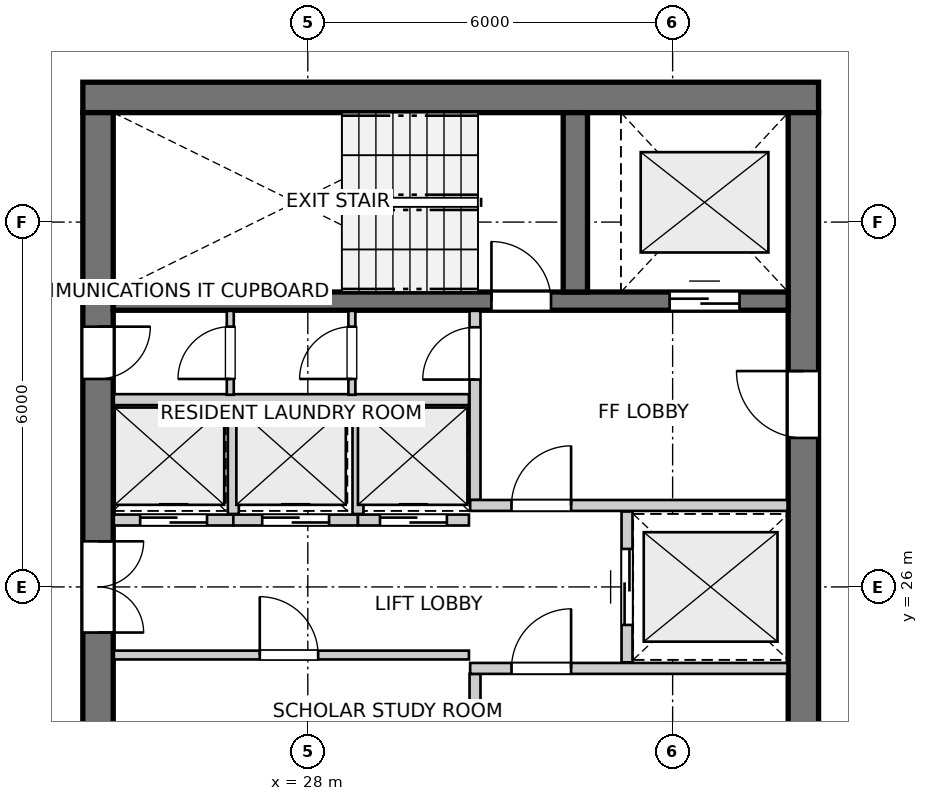
"""IFC4 building model, lengths in metres.
Left out: names, types, materials, properties, quantities, classifications, styles, units other than length and angle.
Written with IfcOpenShell. Run it as: python <this file> out.ifc"""

import sys

from ifc_helpers import new_model, si_unit, direction, frame, frame_2d, origin, place, context, subcontext, project, spatial, rectangle, extrude, source, transform, mapped, element, fill, save


model = new_model("IFC4")
c1 = context("Model", 3, precision=1e-05, world=origin(), true_north=direction((0.0, 1.0)))
c2 = subcontext(c1, "Body", "Model", "MODEL_VIEW")
j1 = project(units=[si_unit("LENGTHUNIT", "METRE"), si_unit("PLANEANGLEUNIT", "RADIAN")], contexts=[c1])
p1 = place(None, origin())
s1 = spatial("IfcSite", under=j1, at=p1, CompositionType="ELEMENT")
p2 = place(p1, origin())
s2 = spatial("IfcBuilding", under=s1, at=p2, CompositionType="ELEMENT")
p3 = place(p2, frame((0.0, 0.0, 214.8)))
s3 = spatial("IfcBuildingStorey", under=s2, at=p3, CompositionType="ELEMENT", Elevation=214.8)
p4 = place(p3, frame((36.4, 34.05, 0.0), z_axis=(0.0, 0.0, 1.0), x_axis=(-1.0, 0.0, 0.0)))
e1 = element("IfcWall", 1, at=p4, inside=s3, PredefinedType="SHEAR", context=c2, shape_type="SweptSolid", body=[
    extrude(rectangle(XDim=12.1, YDim=0.5, at=frame_2d((6.05, 0.0))), origin(), (0.0, 0.0, 1.0), 2.96),
])
p5 = place(p3, frame((24.55, 33.8, 0.0), z_axis=(0.0, 0.0, 1.0), x_axis=(0.0, -1.0, 0.0)))
e2 = element("IfcWall", 2, at=p5, inside=s3, PredefinedType="SHEAR", context=c2, shape_type="SweptSolid", body=[
    extrude(rectangle(XDim=15.6, YDim=0.5, at=frame_2d((7.8, 0.0))), origin(), (0.0, 0.0, 1.0), 2.96),
])
p6 = place(p5, frame((7.05, 0.0, 0.0)))
e3 = element("IfcOpeningElement", 3, at=p6, cuts=e2, PredefinedType="OPENING", context=c2, shape_type="SweptSolid", body=[
    extrude(rectangle(XDim=1.5, YDim=2.15, at=frame_2d((0.75, 1.075))), frame((0.0, 0.26, 0.0), z_axis=(0.0, -1.0, 0.0), x_axis=(1.0, 0.0, 0.0)), (0.0, 0.0, 1.0), 0.52),
])
p7 = place(p5, frame((3.52, 0.0, 0.0)))
e4 = element("IfcOpeningElement", 4, at=p7, cuts=e2, PredefinedType="OPENING", context=c2, shape_type="SweptSolid", body=[
    extrude(rectangle(XDim=0.86, YDim=2.05, at=frame_2d((0.43, 1.025))), frame((0.0, 0.26, 0.0), z_axis=(0.0, -1.0, 0.0), x_axis=(1.0, 0.0, 0.0)), (0.0, 0.0, 1.0), 0.52),
])
p8 = place(p5, frame((11.22, 0.0, 0.0)))
e5 = element("IfcOpeningElement", 5, at=p8, cuts=e2, PredefinedType="OPENING", context=c2, shape_type="SweptSolid", body=[
    extrude(rectangle(XDim=0.86, YDim=2.05, at=frame_2d((0.43, 1.025))), frame((0.0, 0.26, 0.0), z_axis=(0.0, -1.0, 0.0), x_axis=(1.0, 0.0, 0.0)), (0.0, 0.0, 1.0), 0.52),
])
p9 = place(p3, frame((36.15, 18.2, 0.0), z_axis=(0.0, 0.0, 1.0), x_axis=(0.0, 1.0, 0.0)))
e6 = element("IfcWall", 6, at=p9, inside=s3, PredefinedType="SHEAR", context=c2, shape_type="SweptSolid", body=[
    extrude(rectangle(XDim=15.6, YDim=0.5, at=frame_2d((7.8, 0.0))), origin(), (0.0, 0.0, 1.0), 2.96),
])
p10 = place(p9, frame((4.25, 0.0, 0.0)))
e7 = element("IfcOpeningElement", 7, at=p10, cuts=e6, PredefinedType="OPENING", context=c2, shape_type="SweptSolid", body=[
    extrude(rectangle(XDim=1.1, YDim=2.15, at=frame_2d((0.55, 1.075))), frame((0.0, 0.26, 0.0), z_axis=(0.0, -1.0, 0.0), x_axis=(1.0, 0.0, 0.0)), (0.0, 0.0, 1.0), 0.52),
])
p11 = place(p9, frame((10.25, 0.0, 0.0)))
e8 = element("IfcOpeningElement", 8, at=p11, cuts=e6, PredefinedType="OPENING", context=c2, shape_type="SweptSolid", body=[
    extrude(rectangle(XDim=1.1, YDim=2.15, at=frame_2d((0.55, 1.075))), frame((0.0, 0.26, 0.0), z_axis=(0.0, -1.0, 0.0), x_axis=(1.0, 0.0, 0.0)), (0.0, 0.0, 1.0), 0.52),
])
p12 = place(p3, frame((24.8, 30.7, 0.0), z_axis=(0.0, 0.0, 1.0), x_axis=(1.0, 0.0, 0.0)))
e9 = element("IfcWall", 9, at=p12, inside=s3, PredefinedType="SHEAR", context=c2, shape_type="SweptSolid", body=[
    extrude(rectangle(XDim=11.1, YDim=0.3, at=frame_2d((5.55, 0.0))), origin(), (0.0, 0.0, 1.0), 2.96),
])
p13 = place(p12, frame((6.22, 0.0, 0.0)))
e10 = element("IfcOpeningElement", 10, at=p13, cuts=e9, PredefinedType="OPENING", context=c2, shape_type="SweptSolid", body=[
    extrude(rectangle(XDim=0.98, YDim=2.15, at=frame_2d((0.49, 1.075))), frame((0.0, 0.16, 0.0), z_axis=(0.0, -1.0, 0.0), x_axis=(1.0, 0.0, 0.0)), (0.0, 0.0, 1.0), 0.32),
])
p14 = place(p12, frame((9.15, 0.0, 0.0)))
e11 = element("IfcOpeningElement", 11, at=p14, cuts=e9, PredefinedType="OPENING", context=c2, shape_type="SweptSolid", body=[
    extrude(rectangle(XDim=1.15, YDim=2.15, at=frame_2d((0.575, 1.075))), frame((0.0, 0.16, 0.0), z_axis=(0.0, -1.0, 0.0), x_axis=(1.0, 0.0, 0.0)), (0.0, 0.0, 1.0), 0.32),
])
p15 = place(p3, frame((32.4, 30.85, 0.0), z_axis=(0.0, 0.0, 1.0), x_axis=(0.0, 1.0, 0.0)))
e12 = element("IfcWall", 12, at=p15, inside=s3, PredefinedType="SHEAR", context=c2, shape_type="SweptSolid", body=[
    extrude(rectangle(XDim=2.95, YDim=0.4, at=frame_2d((1.475, 0.0))), origin(), (0.0, 0.0, 1.0), 2.96),
])
p16 = place(p3, frame((30.75, 21.46, 0.0), z_axis=(0.0, 0.0, 1.0), x_axis=(0.0, 1.0, 0.0)))
e13 = element("IfcWall", 13, at=p16, inside=s3, PredefinedType="PARTITIONING", context=c2, shape_type="SweptSolid", body=[
    extrude(rectangle(XDim=3.11, YDim=0.18, at=frame_2d((1.555, 0.0))), origin(), (0.0, 0.0, 1.0), 2.96),
])
p17 = place(p16, frame((0.26, 0.0, 0.0)))
e14 = element("IfcOpeningElement", 14, at=p17, cuts=e13, PredefinedType="OPENING", context=c2, shape_type="SweptSolid", body=[
    extrude(rectangle(XDim=0.86, YDim=2.05, at=frame_2d((0.43, 1.025))), frame((0.0, 0.1, 0.0), z_axis=(0.0, -1.0, 0.0), x_axis=(1.0, 0.0, 0.0)), (0.0, 0.0, 1.0), 0.2),
])
p18 = place(p3, frame((30.67, 24.66, 0.0), z_axis=(0.0, 0.0, 1.0), x_axis=(1.0, 0.0, 0.0)))
e15 = element("IfcWall", 15, at=p18, inside=s3, PredefinedType="PARTITIONING", context=c2, shape_type="SweptSolid", body=[
    extrude(rectangle(XDim=5.22, YDim=0.18, at=frame_2d((2.61, 0.0))), origin(), (0.0, 0.0, 1.0), 2.96),
])
p19 = place(p18, frame((0.68, 0.0, 0.0)))
e16 = element("IfcOpeningElement", 16, at=p19, cuts=e15, PredefinedType="OPENING", context=c2, shape_type="SweptSolid", body=[
    extrude(rectangle(XDim=0.98, YDim=2.15, at=frame_2d((0.49, 1.075))), frame((0.0, 0.1, 0.0), z_axis=(0.0, -1.0, 0.0), x_axis=(1.0, 0.0, 0.0)), (0.0, 0.0, 1.0), 0.2),
])
p20 = place(p3, frame((30.75, 27.43, 0.0), z_axis=(0.0, 0.0, 1.0), x_axis=(0.0, 1.0, 0.0)))
e17 = element("IfcWall", 17, at=p20, inside=s3, PredefinedType="PARTITIONING", context=c2, shape_type="SweptSolid", body=[
    extrude(rectangle(XDim=3.11, YDim=0.18, at=frame_2d((1.555, 0.0))), origin(), (0.0, 0.0, 1.0), 2.96),
])
p21 = place(p20, frame((1.98, 0.0, 0.0)))
e18 = element("IfcOpeningElement", 18, at=p21, cuts=e17, PredefinedType="OPENING", context=c2, shape_type="SweptSolid", body=[
    extrude(rectangle(XDim=0.86, YDim=2.05, at=frame_2d((0.43, 1.025))), frame((0.0, 0.1, 0.0), z_axis=(0.0, -1.0, 0.0), x_axis=(1.0, 0.0, 0.0)), (0.0, 0.0, 1.0), 0.2),
])
p22 = place(p3, frame((30.67, 27.34, 0.0), z_axis=(0.0, 0.0, 1.0), x_axis=(1.0, 0.0, 0.0)))
e19 = element("IfcWall", 19, at=p22, inside=s3, PredefinedType="PARTITIONING", context=c2, shape_type="SweptSolid", body=[
    extrude(rectangle(XDim=5.22, YDim=0.18, at=frame_2d((2.61, 0.0))), origin(), (0.0, 0.0, 1.0), 2.96),
])
p23 = place(p22, frame((0.68, 0.0, 0.0)))
e20 = element("IfcOpeningElement", 20, at=p23, cuts=e19, PredefinedType="OPENING", context=c2, shape_type="SweptSolid", body=[
    extrude(rectangle(XDim=0.98, YDim=2.15, at=frame_2d((0.49, 1.075))), frame((0.0, 0.1, 0.0), z_axis=(0.0, -1.0, 0.0), x_axis=(1.0, 0.0, 0.0)), (0.0, 0.0, 1.0), 0.2),
])
p24 = place(p3, frame((33.25, 24.76, 0.0), z_axis=(0.0, 0.0, 1.0), x_axis=(0.0, 1.0, 0.0)))
e21 = element("IfcWall", 21, at=p24, inside=s3, PredefinedType="PARTITIONING", context=c2, shape_type="SweptSolid", body=[
    extrude(rectangle(XDim=2.48, YDim=0.18, at=frame_2d((1.24, 0.0))), origin(), (0.0, 0.0, 1.0), 2.96),
])
p25 = place(p24, frame((0.615, 0.0, 0.0)))
e22 = element("IfcOpeningElement", 22, at=p25, cuts=e21, PredefinedType="OPENING", context=c2, shape_type="SweptSolid", body=[
    extrude(rectangle(XDim=1.25, YDim=2.15, at=frame_2d((0.625, 1.075))), frame((0.0, 0.1, 0.0), z_axis=(0.0, -1.0, 0.0), x_axis=(1.0, 0.0, 0.0)), (0.0, 0.0, 1.0), 0.2),
])
p26 = place(p3, frame((24.81, 24.88, 0.0), z_axis=(0.0, 0.0, 1.0), x_axis=(1.0, 0.0, 0.0)))
e23 = element("IfcWall", 23, at=p26, inside=s3, PredefinedType="PARTITIONING", context=c2, shape_type="SweptSolid", body=[
    extrude(rectangle(XDim=5.84, YDim=0.145, at=frame_2d((2.92, 0.0))), origin(), (0.0, 0.0, 1.0), 2.96),
])
p27 = place(p26, frame((2.4, 0.0, 0.0)))
e24 = element("IfcOpeningElement", 24, at=p27, cuts=e23, PredefinedType="OPENING", context=c2, shape_type="SweptSolid", body=[
    extrude(rectangle(XDim=0.96, YDim=2.1, at=frame_2d((0.48, 1.05))), frame((0.0, 0.083, 0.0), z_axis=(0.0, -1.0, 0.0), x_axis=(1.0, 0.0, 0.0)), (0.0, 0.0, 1.0), 0.165),
])
p28 = place(p3, frame((24.81, 29.08, 0.0), z_axis=(0.0, 0.0, 1.0), x_axis=(1.0, 0.0, 0.0)))
e25 = element("IfcWall", 25, at=p28, inside=s3, PredefinedType="PARTITIONING", context=c2, shape_type="SweptSolid", body=[
    extrude(rectangle(XDim=5.84, YDim=0.18, at=frame_2d((2.92, 0.0))), origin(), (0.0, 0.0, 1.0), 2.96),
])
p29 = place(p3, frame((24.81, 27.1, 0.0), z_axis=(0.0, 0.0, 1.0), x_axis=(1.0, 0.0, 0.0)))
e26 = element("IfcWall", 26, at=p29, inside=s3, PredefinedType="PARTITIONING", context=c2, shape_type="SweptSolid", body=[
    extrude(rectangle(XDim=1.965, YDim=0.18, at=frame_2d((0.982, 0.0))), origin(), (0.0, 0.0, 1.0), 2.96),
])
p30 = place(p29, frame((0.433, 0.0, 0.0)))
e27 = element("IfcOpeningElement", 27, at=p30, cuts=e26, PredefinedType="OPENING", context=c2, shape_type="SweptSolid", body=[
    extrude(rectangle(XDim=1.1, YDim=2.15, at=frame_2d((0.55, 1.075))), frame((0.0, 0.1, 0.0), z_axis=(0.0, -1.0, 0.0), x_axis=(1.0, 0.0, 0.0)), (0.0, 0.0, 1.0), 0.2),
])
p31 = place(p3, frame((26.775, 27.1, 0.0), z_axis=(0.0, 0.0, 1.0), x_axis=(1.0, 0.0, 0.0)))
e28 = element("IfcWall", 28, at=p31, inside=s3, PredefinedType="PARTITIONING", context=c2, shape_type="SweptSolid", body=[
    extrude(rectangle(XDim=2.05, YDim=0.18, at=frame_2d((1.025, 0.0))), origin(), (0.0, 0.0, 1.0), 2.96),
])
p32 = place(p31, frame((0.475, 0.0, 0.0)))
e29 = element("IfcOpeningElement", 29, at=p32, cuts=e28, PredefinedType="OPENING", context=c2, shape_type="SweptSolid", body=[
    extrude(rectangle(XDim=1.1, YDim=2.15, at=frame_2d((0.55, 1.075))), frame((0.0, 0.1, 0.0), z_axis=(0.0, -1.0, 0.0), x_axis=(1.0, 0.0, 0.0)), (0.0, 0.0, 1.0), 0.2),
])
p33 = place(p3, frame((26.775, 27.2, 0.0), z_axis=(0.0, 0.0, 1.0), x_axis=(0.0, 1.0, 0.0)))
e30 = element("IfcWall", 30, at=p33, inside=s3, PredefinedType="PARTITIONING", context=c2, shape_type="SweptSolid", body=[
    extrude(rectangle(XDim=1.78, YDim=0.18, at=frame_2d((0.89, 0.0))), origin(), (0.0, 0.0, 1.0), 2.96),
])
p34 = place(p3, frame((28.825, 27.1, 0.0), z_axis=(0.0, 0.0, 1.0), x_axis=(1.0, 0.0, 0.0)))
e31 = element("IfcWall", 31, at=p34, inside=s3, PredefinedType="PARTITIONING", context=c2, shape_type="SweptSolid", body=[
    extrude(rectangle(XDim=1.825, YDim=0.18, at=frame_2d((0.913, 0.0))), origin(), (0.0, 0.0, 1.0), 2.96),
])
p35 = place(p34, frame((0.363, 0.0, 0.0)))
e32 = element("IfcOpeningElement", 32, at=p35, cuts=e31, PredefinedType="OPENING", context=c2, shape_type="SweptSolid", body=[
    extrude(rectangle(XDim=1.1, YDim=2.15, at=frame_2d((0.55, 1.075))), frame((0.0, 0.1, 0.0), z_axis=(0.0, -1.0, 0.0), x_axis=(1.0, 0.0, 0.0)), (0.0, 0.0, 1.0), 0.2),
])
p36 = place(p3, frame((28.825, 27.2, 0.0), z_axis=(0.0, 0.0, 1.0), x_axis=(0.0, 1.0, 0.0)))
e33 = element("IfcWall", 33, at=p36, inside=s3, PredefinedType="PARTITIONING", context=c2, shape_type="SweptSolid", body=[
    extrude(rectangle(XDim=1.78, YDim=0.18, at=frame_2d((0.89, 0.0))), origin(), (0.0, 0.0, 1.0), 2.96),
])
p37 = place(p3, frame((26.725, 29.16, 0.0), z_axis=(0.0, 0.0, 1.0), x_axis=(0.0, 1.0, 0.0)))
e34 = element("IfcWall", 34, at=p37, inside=s3, PredefinedType="PARTITIONING", context=c2, shape_type="SweptSolid", body=[
    extrude(rectangle(XDim=1.38, YDim=0.115, at=frame_2d((0.69, 0.0))), origin(), (0.0, 0.0, 1.0), 2.96),
])
p38 = place(p37, frame((0.26, 0.0, 0.0)))
e35 = element("IfcOpeningElement", 35, at=p38, cuts=e34, PredefinedType="OPENING", context=c2, shape_type="SweptSolid", body=[
    extrude(rectangle(XDim=0.86, YDim=2.05, at=frame_2d((0.43, 1.025))), frame((0.0, 0.067, 0.0), z_axis=(0.0, -1.0, 0.0), x_axis=(1.0, 0.0, 0.0)), (0.0, 0.0, 1.0), 0.135),
])
p39 = place(p3, frame((28.725, 29.16, 0.0), z_axis=(0.0, 0.0, 1.0), x_axis=(0.0, 1.0, 0.0)))
e36 = element("IfcWall", 36, at=p39, inside=s3, PredefinedType="PARTITIONING", context=c2, shape_type="SweptSolid", body=[
    extrude(rectangle(XDim=1.38, YDim=0.115, at=frame_2d((0.69, 0.0))), origin(), (0.0, 0.0, 1.0), 2.96),
])
p40 = place(p39, frame((0.26, 0.0, 0.0)))
e37 = element("IfcOpeningElement", 37, at=p40, cuts=e36, PredefinedType="OPENING", context=c2, shape_type="SweptSolid", body=[
    extrude(rectangle(XDim=0.86, YDim=2.05, at=frame_2d((0.43, 1.025))), frame((0.0, 0.067, 0.0), z_axis=(0.0, -1.0, 0.0), x_axis=(1.0, 0.0, 0.0)), (0.0, 0.0, 1.0), 0.135),
])
m1 = source(origin(), c2, "Body", "SweptSolid", [
    extrude(rectangle(XDim=0.98, YDim=2.15, at=frame_2d((0.49, 1.075))), frame((0.0, 0.025, 0.0), z_axis=(0.0, -1.0, 0.0), x_axis=(1.0, 0.0, 0.0)), (0.0, 0.0, 1.0), 0.05),
])
p41 = place(p13, origin())
e38 = element("IfcDoor", 38, at=p41, inside=s3, OperationType="SINGLE_SWING_LEFT", PredefinedType="DOOR", context=c2, shape_type="MappedRepresentation", body=[
    mapped(m1, transform((0.0, 0.0, 0.0), x_axis=(1.0, 0.0, 0.0), y_axis=(0.0, 1.0, 0.0), z_axis=(0.0, 0.0, 1.0), scale=1.0)),
])
fill(e10, e38)
m2 = source(origin(), c2, "Body", "SweptSolid", [
    extrude(rectangle(XDim=1.15, YDim=2.15, at=frame_2d((0.575, 1.075))), frame((0.0, 0.025, 0.0), z_axis=(0.0, -1.0, 0.0), x_axis=(1.0, 0.0, 0.0)), (0.0, 0.0, 1.0), 0.05),
])
p42 = place(p14, origin())
e39 = element("IfcDoor", 39, at=p42, inside=s3, OperationType="DOUBLE_DOOR_SLIDING", PredefinedType="DOOR", context=c2, shape_type="MappedRepresentation", body=[
    mapped(m2, transform((0.0, 0.0, 0.0), x_axis=(1.0, 0.0, 0.0), y_axis=(0.0, 1.0, 0.0), z_axis=(0.0, 0.0, 1.0), scale=1.0)),
])
fill(e11, e39)
m3 = source(origin(), c2, "Body", "SweptSolid", [
    extrude(rectangle(XDim=1.1, YDim=2.15, at=frame_2d((0.55, 1.075))), frame((0.0, 0.025, 0.0), z_axis=(0.0, -1.0, 0.0), x_axis=(1.0, 0.0, 0.0)), (0.0, 0.0, 1.0), 0.05),
])
p43 = place(p11, origin())
e40 = element("IfcDoor", 40, at=p43, inside=s3, OperationType="SINGLE_SWING_RIGHT", PredefinedType="DOOR", context=c2, shape_type="MappedRepresentation", body=[
    mapped(m3, transform((0.0, 0.0, 0.0), x_axis=(1.0, 0.0, 0.0), y_axis=(0.0, 1.0, 0.0), z_axis=(0.0, 0.0, 1.0), scale=1.0)),
])
fill(e8, e40)
m4 = source(origin(), c2, "Body", "SweptSolid", [
    extrude(rectangle(XDim=1.5, YDim=2.15, at=frame_2d((0.75, 1.075))), frame((0.0, 0.025, 0.0), z_axis=(0.0, -1.0, 0.0), x_axis=(1.0, 0.0, 0.0)), (0.0, 0.0, 1.0), 0.05),
])
p44 = place(p6, origin())
e41 = element("IfcDoor", 41, at=p44, inside=s3, OperationType="DOUBLE_DOOR_SINGLE_SWING", PredefinedType="DOOR", context=c2, shape_type="MappedRepresentation", body=[
    mapped(m4, transform((0.0, 0.0, 0.0), x_axis=(1.0, 0.0, 0.0), y_axis=(0.0, 1.0, 0.0), z_axis=(0.0, 0.0, 1.0), scale=1.0)),
])
fill(e3, e41)
m5 = source(origin(), c2, "Body", "SweptSolid", [
    extrude(rectangle(XDim=0.86, YDim=2.05, at=frame_2d((0.43, 1.025))), frame((0.0, 0.025, 0.0), z_axis=(0.0, -1.0, 0.0), x_axis=(1.0, 0.0, 0.0)), (0.0, 0.0, 1.0), 0.05),
])
p45 = place(p7, origin())
e42 = element("IfcDoor", 42, at=p45, inside=s3, OperationType="SINGLE_SWING_LEFT", PredefinedType="DOOR", context=c2, shape_type="MappedRepresentation", body=[
    mapped(m5, transform((0.0, 0.0, 0.0), x_axis=(1.0, 0.0, 0.0), y_axis=(0.0, 1.0, 0.0), z_axis=(0.0, 0.0, 1.0), scale=1.0)),
])
fill(e4, e42)
p46 = place(p19, origin())
e43 = element("IfcDoor", 43, at=p46, inside=s3, OperationType="SINGLE_SWING_RIGHT", PredefinedType="DOOR", context=c2, shape_type="MappedRepresentation", body=[
    mapped(m1, transform((0.0, 0.0, 0.0), x_axis=(1.0, 0.0, 0.0), y_axis=(0.0, 1.0, 0.0), z_axis=(0.0, 0.0, 1.0), scale=1.0)),
])
fill(e16, e43)
p47 = place(p21, origin())
e44 = element("IfcDoor", 44, at=p47, inside=s3, OperationType="SINGLE_SWING_LEFT", PredefinedType="DOOR", context=c2, shape_type="MappedRepresentation", body=[
    mapped(m5, transform((0.0, 0.0, 0.0), x_axis=(1.0, 0.0, 0.0), y_axis=(0.0, 1.0, 0.0), z_axis=(0.0, 0.0, 1.0), scale=1.0)),
])
fill(e18, e44)
p48 = place(p23, origin())
e45 = element("IfcDoor", 45, at=p48, inside=s3, OperationType="SINGLE_SWING_RIGHT", PredefinedType="DOOR", context=c2, shape_type="MappedRepresentation", body=[
    mapped(m1, transform((0.0, 0.0, 0.0), x_axis=(1.0, 0.0, 0.0), y_axis=(0.0, 1.0, 0.0), z_axis=(0.0, 0.0, 1.0), scale=1.0)),
])
fill(e20, e45)
m6 = source(origin(), c2, "Body", "SweptSolid", [
    extrude(rectangle(XDim=1.25, YDim=2.15, at=frame_2d((0.625, 1.075))), frame((0.0, 0.025, 0.0), z_axis=(0.0, -1.0, 0.0), x_axis=(1.0, 0.0, 0.0)), (0.0, 0.0, 1.0), 0.05),
])
p49 = place(p25, origin())
e46 = element("IfcDoor", 46, at=p49, inside=s3, OperationType="DOUBLE_DOOR_SLIDING", PredefinedType="DOOR", context=c2, shape_type="MappedRepresentation", body=[
    mapped(m6, transform((0.0, 0.0, 0.0), x_axis=(1.0, 0.0, 0.0), y_axis=(0.0, 1.0, 0.0), z_axis=(0.0, 0.0, 1.0), scale=1.0)),
])
fill(e22, e46)
m7 = source(origin(), c2, "Body", "SweptSolid", [
    extrude(rectangle(XDim=0.96, YDim=2.1, at=frame_2d((0.48, 1.05))), frame((0.0, 0.025, 0.0), z_axis=(0.0, -1.0, 0.0), x_axis=(1.0, 0.0, 0.0)), (0.0, 0.0, 1.0), 0.05),
])
p50 = place(p27, origin())
e47 = element("IfcDoor", 47, at=p50, inside=s3, OperationType="SINGLE_SWING_LEFT", PredefinedType="DOOR", context=c2, shape_type="MappedRepresentation", body=[
    mapped(m7, transform((0.0, 0.0, 0.0), x_axis=(1.0, 0.0, 0.0), y_axis=(0.0, 1.0, 0.0), z_axis=(0.0, 0.0, 1.0), scale=1.0)),
])
fill(e24, e47)
p51 = place(p30, origin())
e48 = element("IfcDoor", 48, at=p51, inside=s3, OperationType="DOUBLE_DOOR_SLIDING", PredefinedType="DOOR", context=c2, shape_type="MappedRepresentation", body=[
    mapped(m3, transform((0.0, 0.0, 0.0), x_axis=(1.0, 0.0, 0.0), y_axis=(0.0, 1.0, 0.0), z_axis=(0.0, 0.0, 1.0), scale=1.0)),
])
fill(e27, e48)
p52 = place(p32, origin())
e49 = element("IfcDoor", 49, at=p52, inside=s3, OperationType="DOUBLE_DOOR_SLIDING", PredefinedType="DOOR", context=c2, shape_type="MappedRepresentation", body=[
    mapped(m3, transform((0.0, 0.0, 0.0), x_axis=(1.0, 0.0, 0.0), y_axis=(0.0, 1.0, 0.0), z_axis=(0.0, 0.0, 1.0), scale=1.0)),
])
fill(e29, e49)
p53 = place(p35, origin())
e50 = element("IfcDoor", 50, at=p53, inside=s3, OperationType="DOUBLE_DOOR_SLIDING", PredefinedType="DOOR", context=c2, shape_type="MappedRepresentation", body=[
    mapped(m3, transform((0.0, 0.0, 0.0), x_axis=(1.0, 0.0, 0.0), y_axis=(0.0, 1.0, 0.0), z_axis=(0.0, 0.0, 1.0), scale=1.0)),
])
fill(e32, e50)
p54 = place(p38, origin())
e51 = element("IfcDoor", 51, at=p54, inside=s3, OperationType="SINGLE_SWING_LEFT", PredefinedType="DOOR", context=c2, shape_type="MappedRepresentation", body=[
    mapped(m5, transform((0.0, 0.0, 0.0), x_axis=(1.0, 0.0, 0.0), y_axis=(0.0, 1.0, 0.0), z_axis=(0.0, 0.0, 1.0), scale=1.0)),
])
fill(e35, e51)
p55 = place(p40, origin())
e52 = element("IfcDoor", 52, at=p55, inside=s3, OperationType="SINGLE_SWING_LEFT", PredefinedType="DOOR", context=c2, shape_type="MappedRepresentation", body=[
    mapped(m5, transform((0.0, 0.0, 0.0), x_axis=(1.0, 0.0, 0.0), y_axis=(0.0, 1.0, 0.0), z_axis=(0.0, 0.0, 1.0), scale=1.0)),
])
fill(e37, e52)
save(model, sys.argv[1])
